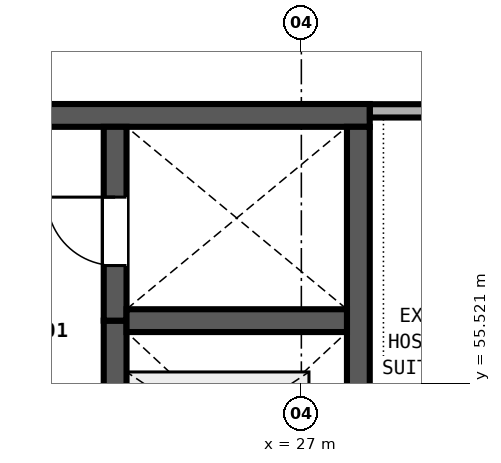
"""IFC4 building model, lengths in metres.
Left out: names, types, materials, properties, quantities, classifications, styles, units other than length and angle.
Written with IfcOpenShell. Run it as: python <this file> out.ifc"""

import sys

from ifc_helpers import new_model, si_unit, direction, frame, frame_2d, origin, place, context, subcontext, project, spatial, rectangle, extrude, element, fill, save


model = new_model("IFC4")
c1 = context("Model", 3, precision=1e-05, world=origin(), true_north=direction((0.0, 1.0)))
c2 = subcontext(c1, "Body", "Model", "MODEL_VIEW")
j1 = project(units=[si_unit("LENGTHUNIT", "METRE"), si_unit("PLANEANGLEUNIT", "RADIAN")], contexts=[c1])
p1 = place(None, origin())
s1 = spatial("IfcSite", under=j1, at=p1, CompositionType="ELEMENT")
p2 = place(p1, origin())
s2 = spatial("IfcBuilding", under=s1, at=p2, CompositionType="ELEMENT")
p3 = place(p2, frame((0.0, 0.0, 14.4)))
s3 = spatial("IfcBuildingStorey", under=s2, at=p3, CompositionType="ELEMENT", Elevation=14.4)
p4 = place(p3, frame((27.9, 59.05, 0.0), z_axis=(0.0, 0.0, 1.0), x_axis=(-1.0, 0.0, 0.0)))
e1 = element("IfcWall", 1, at=p4, inside=s3, PredefinedType="SHEAR", context=c2, shape_type="SweptSolid", body=[
    extrude(rectangle(XDim=18.0, YDim=0.3, at=frame_2d((9.0, 0.0))), origin(), (0.0, 0.0, 1.0), 4.48),
])
p5 = place(p4, frame((4.7, 0.0, 0.0)))
e2 = element("IfcOpeningElement", 2, at=p5, cuts=e1, PredefinedType="OPENING", context=c2, shape_type="SweptSolid", body=[
    extrude(rectangle(XDim=1.9, YDim=2.25, at=frame_2d((0.95, 1.125))), frame((0.0, 0.16, 0.0), z_axis=(0.0, -1.0, 0.0), x_axis=(1.0, 0.0, 0.0)), (0.0, 0.0, 1.0), 0.32),
])
p6 = place(p3, frame((27.75, 53.5, 0.0), z_axis=(0.0, 0.0, 1.0), x_axis=(0.0, 1.0, 0.0)))
e3 = element("IfcWall", 3, at=p6, inside=s3, PredefinedType="SHEAR", context=c2, shape_type="SweptSolid", body=[
    extrude(rectangle(XDim=5.4, YDim=0.3, at=frame_2d((2.7, 0.0))), origin(), (0.0, 0.0, 1.0), 4.48),
])
p7 = place(p3, frame((24.55, 53.5, 0.0), z_axis=(0.0, 0.0, 1.0), x_axis=(0.0, 1.0, 0.0)))
e4 = element("IfcWall", 4, at=p7, inside=s3, PredefinedType="SHEAR", context=c2, shape_type="SweptSolid", body=[
    extrude(rectangle(XDim=2.85, YDim=0.3, at=frame_2d((1.425, 0.0))), origin(), (0.0, 0.0, 1.0), 4.48),
])
p8 = place(p7, frame((0.775, 0.0, 0.0)))
e5 = element("IfcOpeningElement", 5, at=p8, cuts=e4, PredefinedType="OPENING", context=c2, shape_type="SweptSolid", body=[
    extrude(rectangle(XDim=1.1, YDim=2.1, at=frame_2d((0.55, 1.05))), frame((0.0, 0.16, 0.0), z_axis=(0.0, -1.0, 0.0), x_axis=(1.0, 0.0, 0.0)), (0.0, 0.0, 1.0), 0.32),
])
p9 = place(p3, frame((24.55, 56.35, 0.0), z_axis=(0.0, 0.0, 1.0), x_axis=(0.0, 1.0, 0.0)))
e6 = element("IfcWall", 6, at=p9, inside=s3, PredefinedType="SHEAR", context=c2, shape_type="SweptSolid", body=[
    extrude(rectangle(XDim=2.55, YDim=0.3, at=frame_2d((1.275, 0.0))), origin(), (0.0, 0.0, 1.0), 4.48),
])
p10 = place(p9, frame((0.725, 0.0, 0.0)))
e7 = element("IfcOpeningElement", 7, at=p10, cuts=e6, PredefinedType="OPENING", context=c2, shape_type="SweptSolid", body=[
    extrude(rectangle(XDim=0.9, YDim=2.1, at=frame_2d((0.45, 1.05))), frame((0.0, 0.16, 0.0), z_axis=(0.0, -1.0, 0.0), x_axis=(1.0, 0.0, 0.0)), (0.0, 0.0, 1.0), 0.32),
])
p11 = place(p3, frame((24.7, 56.35, 0.0), z_axis=(0.0, 0.0, 1.0), x_axis=(1.0, 0.0, 0.0)))
e8 = element("IfcWall", 8, at=p11, inside=s3, PredefinedType="SHEAR", context=c2, shape_type="SweptSolid", body=[
    extrude(rectangle(XDim=2.9, YDim=0.3, at=frame_2d((1.45, 0.0))), origin(), (0.0, 0.0, 1.0), 4.48),
])
p12 = place(p3, frame((27.902, 59.11, 0.0), z_axis=(0.0, 0.0, 1.0), x_axis=(1.0, 0.0, 0.0)))
e9 = element("IfcWall", 9, at=p12, inside=s3, PredefinedType="PARTITIONING", context=c2, shape_type="SweptSolid", body=[
    extrude(rectangle(XDim=2.038, YDim=0.175, at=frame_2d((1.019, 0.0))), origin(), (0.0, 0.0, 1.0), 3.56),
])
p13 = place(p10, origin())
e10 = element("IfcDoor", 10, at=p13, inside=s3, OperationType="SINGLE_SWING_RIGHT", PredefinedType="DOOR", context=c2, shape_type="SweptSolid", body=[
    extrude(rectangle(XDim=0.9, YDim=2.1, at=frame_2d((0.45, 1.05))), frame((0.0, 0.025, 0.0), z_axis=(0.0, -1.0, 0.0), x_axis=(1.0, 0.0, 0.0)), (0.0, 0.0, 1.0), 0.05),
])
fill(e7, e10)
save(model, sys.argv[1])
